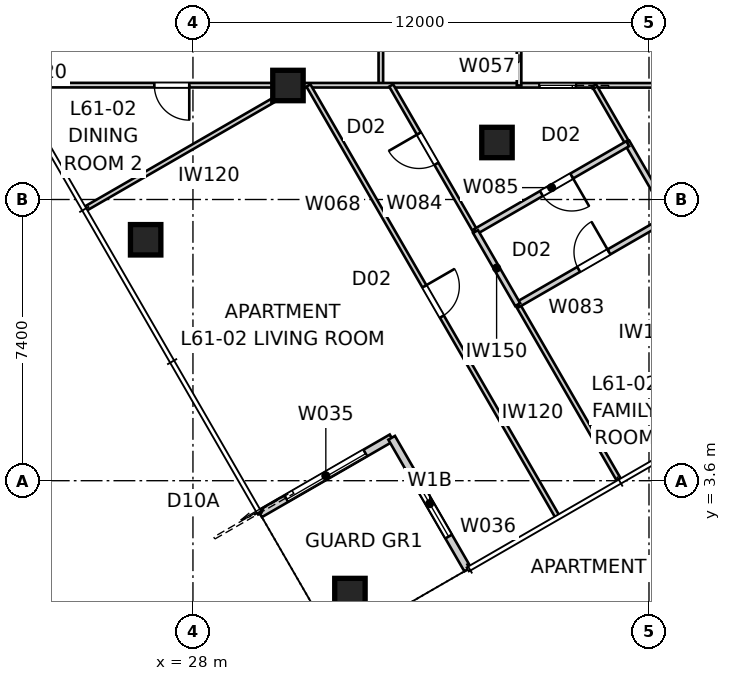
"""IFC4 building model, lengths in metres.
Left out: names, types, materials, properties, quantities, classifications, styles, units other than length and angle.
Written with IfcOpenShell. Run it as: python <this file> out.ifc"""

import sys

from ifc_helpers import new_model, si_unit, direction, frame, frame_2d, origin, origin_2d, place, context, subcontext, project, spatial, rectangle, extrude, element, fill, save


model = new_model("IFC4")
c1 = context("Model", 3, precision=1e-05, world=origin(), true_north=direction((0.0, 1.0)))
c2 = subcontext(c1, "Body", "Model", "MODEL_VIEW")
j1 = project(units=[si_unit("LENGTHUNIT", "METRE"), si_unit("PLANEANGLEUNIT", "RADIAN")], contexts=[c1])
p1 = place(None, origin())
s1 = spatial("IfcSite", under=j1, at=p1, CompositionType="ELEMENT")
p2 = place(p1, origin())
s2 = spatial("IfcBuilding", under=s1, at=p2, CompositionType="ELEMENT")
p3 = place(p2, frame((0.0, 0.0, 221.8)))
s3 = spatial("IfcBuildingStorey", under=s2, at=p3, CompositionType="ELEMENT", Elevation=221.8)
for number, where, z_axis, x_axis in (
    (1, (32.13, 0.63, 0.0), (0.0, 0.0, 1.0), (1.0, 0.0, 0.0)),
    (2, (26.755, 9.94, 0.0), (0.0, 0.0, 1.0), (1.0, 0.0, 0.0)),
    (3, (30.5, 14.0, 0.0), (0.0, 0.0, 1.0), (1.0, 0.0, 0.0)),
    (4, (36.0, 12.5, 0.0), (0.0, 0.0, 1.0), (1.0, 0.0, 0.0)),
):
    element("IfcColumn", number, at=place(p3, frame(where, z_axis=z_axis, x_axis=x_axis)), inside=s3, PredefinedType="COLUMN", context=c2, shape_type="SweptSolid", body=[
        extrude(rectangle(XDim=0.8, YDim=0.8, at=origin_2d()), origin(), (0.0, 0.0, 1.0), 3.4),
    ])
p4 = place(p3, frame((29.764, 2.729, 0.0), z_axis=(0.0, 0.0, 1.0), x_axis=(0.866026010844, 0.49999894854, 0.0)))
e5 = element("IfcWall", 5, at=p4, inside=s3, PredefinedType="SOLIDWALL", context=c2, shape_type="SweptSolid", body=[
    extrude(rectangle(XDim=4.0, YDim=0.2, at=frame_2d((2.0, 0.0))), origin(), (0.0, 0.0, 1.0), 3.25),
])
p5 = place(p4, frame((0.8, 0.0, 0.0)))
e6 = element("IfcOpeningElement", 6, at=p5, cuts=e5, PredefinedType="OPENING", context=c2, shape_type="SweptSolid", body=[
    extrude(rectangle(XDim=2.4, YDim=2.1, at=frame_2d((1.2, 1.05))), frame((0.0, 0.11, 0.0), z_axis=(0.0, -1.0, 0.0), x_axis=(1.0, 0.0, 0.0)), (0.0, 0.0, 1.0), 0.22),
])
p6 = place(p3, frame((33.229, 4.729, 0.0), z_axis=(0.0, 0.0, 1.0), x_axis=(0.49999894854, -0.866026010844, 0.0)))
e7 = element("IfcWall", 7, at=p6, inside=s3, PredefinedType="SOLIDWALL", context=c2, shape_type="SweptSolid", body=[
    extrude(rectangle(XDim=4.0, YDim=0.2, at=frame_2d((2.0, 0.0))), origin(), (0.0, 0.0, 1.0), 3.25),
])
p7 = place(p6, frame((1.0, 0.0, 0.45)))
e8 = element("IfcOpeningElement", 8, at=p7, cuts=e7, PredefinedType="OPENING", context=c2, shape_type="SweptSolid", body=[
    extrude(rectangle(XDim=2.0, YDim=1.8, at=frame_2d((1.0, 0.9))), frame((0.0, 0.11, 0.0), z_axis=(0.0, -1.0, 0.0), x_axis=(1.0, 0.0, 0.0)), (0.0, 0.0, 1.0), 0.22),
])
p8 = place(p3, frame((32.944, 17.9, 0.0), z_axis=(0.0, 0.0, 1.0), x_axis=(0.0, -1.0, 0.0)))
e9 = element("IfcWall", 9, at=p8, inside=s3, PredefinedType="PARTITIONING", context=c2, shape_type="SweptSolid", body=[
    extrude(rectangle(XDim=3.9, YDim=0.12, at=frame_2d((1.95, 0.0))), origin(), (0.0, 0.0, 1.0), 3.25),
])
p9 = place(p8, frame((1.849, 0.0, 0.0)))
e10 = element("IfcOpeningElement", 10, at=p9, cuts=e9, PredefinedType="OPENING", context=c2, shape_type="SweptSolid", body=[
    extrude(rectangle(XDim=0.92, YDim=2.34, at=frame_2d((0.46, 1.17))), frame((0.0, 0.07, 0.0), z_axis=(0.0, -1.0, 0.0), x_axis=(1.0, 0.0, 0.0)), (0.0, 0.0, 1.0), 0.14),
])
p10 = place(p3, frame((51.757, 14.0, 0.0), z_axis=(0.0, 0.0, 1.0), x_axis=(-0.999999938148, 0.000351716958, 0.0)))
e11 = element("IfcWall", 11, at=p10, inside=s3, PredefinedType="PARTITIONING", context=c2, shape_type="SweptSolid", body=[
    extrude(rectangle(XDim=28.46, YDim=0.12, at=frame_2d((14.23, 0.0))), origin(), (0.0, 0.0, 1.0), 2.55),
])
p11 = place(p10, frame((3.82, 0.0, 0.0)))
e12 = element("IfcOpeningElement", 12, at=p11, cuts=e11, PredefinedType="OPENING", context=c2, shape_type="SweptSolid", body=[
    extrude(rectangle(XDim=0.92, YDim=2.34, at=frame_2d((0.46, 1.17))), frame((0.0, 0.07, 0.0), z_axis=(0.0, -1.0, 0.0), x_axis=(1.0, 0.0, 0.0)), (0.0, 0.0, 1.0), 0.14),
])
p12 = place(p10, frame((9.17, 0.0, 0.0)))
e13 = element("IfcOpeningElement", 13, at=p12, cuts=e11, PredefinedType="OPENING", context=c2, shape_type="SweptSolid", body=[
    extrude(rectangle(XDim=0.96, YDim=2.1, at=frame_2d((0.48, 1.05))), frame((0.0, 0.07, 0.0), z_axis=(0.0, -1.0, 0.0), x_axis=(1.0, 0.0, 0.0)), (0.0, 0.0, 1.0), 0.14),
])
p13 = place(p10, frame((13.68, 0.0, 0.0)))
e14 = element("IfcOpeningElement", 14, at=p13, cuts=e11, PredefinedType="OPENING", context=c2, shape_type="SweptSolid", body=[
    extrude(rectangle(XDim=0.96, YDim=2.1, at=frame_2d((0.48, 1.05))), frame((0.0, 0.07, 0.0), z_axis=(0.0, -1.0, 0.0), x_axis=(1.0, 0.0, 0.0)), (0.0, 0.0, 1.0), 0.14),
])
p14 = place(p10, frame((23.854, 0.0, 0.0)))
e15 = element("IfcOpeningElement", 15, at=p14, cuts=e11, PredefinedType="OPENING", context=c2, shape_type="SweptSolid", body=[
    extrude(rectangle(XDim=0.92, YDim=2.34, at=frame_2d((0.46, 1.17))), frame((0.0, 0.07, 0.0), z_axis=(0.0, -1.0, 0.0), x_axis=(1.0, 0.0, 0.0)), (0.0, 0.0, 1.0), 0.14),
])
p15 = place(p3, frame((36.581, 14.0, 0.0), z_axis=(0.0, 0.0, 1.0), x_axis=(0.0, 1.0, 0.0)))
e16 = element("IfcWall", 16, at=p15, inside=s3, PredefinedType="PARTITIONING", context=c2, shape_type="SweptSolid", body=[
    extrude(rectangle(XDim=3.9, YDim=0.12, at=frame_2d((1.95, 0.0))), origin(), (0.0, 0.0, 1.0), 3.25),
])
p16 = place(p15, frame((1.47, 0.0, 0.0)))
e17 = element("IfcOpeningElement", 17, at=p16, cuts=e16, PredefinedType="OPENING", context=c2, shape_type="SweptSolid", body=[
    extrude(rectangle(XDim=0.96, YDim=2.1, at=frame_2d((0.48, 1.05))), frame((0.0, 0.07, 0.0), z_axis=(0.0, -1.0, 0.0), x_axis=(1.0, 0.0, 0.0)), (0.0, 0.0, 1.0), 0.14),
])
p17 = place(p3, frame((31.039, 14.0, 0.0), z_axis=(0.0, 0.0, 1.0), x_axis=(0.500006184843, -0.866021832934, 0.0)))
e18 = element("IfcWall", 18, at=p17, inside=s3, PredefinedType="PARTITIONING", context=c2, shape_type="SweptSolid", body=[
    extrude(rectangle(XDim=13.084, YDim=0.12, at=frame_2d((6.542, 0.0))), origin(), (0.0, 0.0, 1.0), 3.25),
])
p18 = place(p17, frame((6.102, 0.0, 0.0)))
e19 = element("IfcOpeningElement", 19, at=p18, cuts=e18, PredefinedType="OPENING", context=c2, shape_type="SweptSolid", body=[
    extrude(rectangle(XDim=0.92, YDim=2.34, at=frame_2d((0.46, 1.17))), frame((0.0, 0.07, 0.0), z_axis=(0.0, -1.0, 0.0), x_axis=(1.0, 0.0, 0.0)), (0.0, 0.0, 1.0), 0.14),
])
p19 = place(p3, frame((25.174, 10.759, 0.0), z_axis=(0.0, 0.0, 1.0), x_axis=(0.866023120914, 0.500003954026, 0.0)))
e20 = element("IfcWall", 20, at=p19, inside=s3, PredefinedType="PARTITIONING", context=c2, shape_type="SweptSolid", body=[
    extrude(rectangle(XDim=6.481, YDim=0.12, at=frame_2d((3.241, 0.0))), origin(), (0.0, 0.0, 1.0), 3.25),
])
p20 = place(p3, frame((39.416, 12.512, 0.0), z_axis=(0.0, 0.0, 1.0), x_axis=(-0.500005339912, 0.866022320763, 0.0)))
e21 = element("IfcWall", 21, at=p20, inside=s3, PredefinedType="PARTITIONING", context=c2, shape_type="SweptSolid", body=[
    extrude(rectangle(XDim=1.718, YDim=0.12, at=frame_2d((0.859, 0.0))), origin(), (0.0, 0.0, 1.0), 3.25),
])
p21 = place(p3, frame((40.525, 10.59, 0.0), z_axis=(0.0, 0.0, 1.0), x_axis=(-0.499973265211, 0.866040838572, 0.0)))
e22 = element("IfcWall", 22, at=p21, inside=s3, PredefinedType="SOLIDWALL", context=c2, shape_type="SweptSolid", body=[
    extrude(rectangle(XDim=2.219, YDim=0.15, at=frame_2d((1.109, 0.0))), origin(), (0.0, 0.0, 1.0), 3.25),
])
p22 = place(p3, frame((39.214, 3.612, 0.0), z_axis=(0.0, 0.0, 1.0), x_axis=(-0.499995631649, 0.866027925839, 0.0)))
e23 = element("IfcWall", 23, at=p22, inside=s3, PredefinedType="PARTITIONING", context=c2, shape_type="SweptSolid", body=[
    extrude(rectangle(XDim=5.338, YDim=0.12, at=frame_2d((2.669, 0.0))), origin(), (0.0, 0.0, 1.0), 3.25),
])
p23 = place(p3, frame((36.545, 8.234, 0.0), z_axis=(0.0, 0.0, 1.0), x_axis=(0.866025598446, 0.499999662836, 0.0)))
e24 = element("IfcWall", 24, at=p23, inside=s3, PredefinedType="SOLIDWALL", context=c2, shape_type="SweptSolid", body=[
    extrude(rectangle(XDim=4.625, YDim=0.15, at=frame_2d((2.312, 0.0))), origin(), (0.0, 0.0, 1.0), 3.25),
])
p24 = place(p23, frame((1.853, 0.0, 0.0)))
e25 = element("IfcOpeningElement", 25, at=p24, cuts=e24, PredefinedType="OPENING", context=c2, shape_type="SweptSolid", body=[
    extrude(rectangle(XDim=0.92, YDim=2.34, at=frame_2d((0.46, 1.17))), frame((0.0, 0.085, 0.0), z_axis=(0.0, -1.0, 0.0), x_axis=(1.0, 0.0, 0.0)), (0.0, 0.0, 1.0), 0.17),
])
p25 = place(p3, frame((35.435, 10.156, 0.0), z_axis=(0.0, 0.0, 1.0), x_axis=(-0.499966886051, 0.866044521288, 0.0)))
e26 = element("IfcWall", 26, at=p25, inside=s3, PredefinedType="PARTITIONING", context=c2, shape_type="SweptSolid", body=[
    extrude(rectangle(XDim=4.438, YDim=0.12, at=frame_2d((2.219, 0.0))), origin(), (0.0, 0.0, 1.0), 3.25),
])
p26 = place(p25, frame((2.059, 0.0, 0.0)))
e27 = element("IfcOpeningElement", 27, at=p26, cuts=e26, PredefinedType="OPENING", context=c2, shape_type="SweptSolid", body=[
    extrude(rectangle(XDim=0.92, YDim=2.34, at=frame_2d((0.46, 1.17))), frame((0.0, 0.07, 0.0), z_axis=(0.0, -1.0, 0.0), x_axis=(1.0, 0.0, 0.0)), (0.0, 0.0, 1.0), 0.14),
])
p27 = place(p3, frame((39.441, 12.469, 0.0), z_axis=(0.0, 0.0, 1.0), x_axis=(-0.866025598446, -0.499999662836, 0.0)))
e28 = element("IfcWall", 28, at=p27, inside=s3, PredefinedType="SOLIDWALL", context=c2, shape_type="SweptSolid", body=[
    extrude(rectangle(XDim=4.625, YDim=0.15, at=frame_2d((2.312, 0.0))), origin(), (0.0, 0.0, 1.0), 3.25),
])
p28 = place(p27, frame((1.702, 0.0, 0.0)))
e29 = element("IfcOpeningElement", 29, at=p28, cuts=e28, PredefinedType="OPENING", context=c2, shape_type="SweptSolid", body=[
    extrude(rectangle(XDim=0.92, YDim=2.34, at=frame_2d((0.46, 1.17))), frame((0.0, 0.085, 0.0), z_axis=(0.0, -1.0, 0.0), x_axis=(1.0, 0.0, 0.0)), (0.0, 0.0, 1.0), 0.17),
])
p29 = place(p3, frame((35.435, 10.156, 0.0), z_axis=(0.0, 0.0, 1.0), x_axis=(0.500008142102, -0.866020702889, 0.0)))
e30 = element("IfcWall", 30, at=p29, inside=s3, PredefinedType="SOLIDWALL", context=c2, shape_type="SweptSolid", body=[
    extrude(rectangle(XDim=2.219, YDim=0.15, at=frame_2d((1.11, 0.0))), origin(), (0.0, 0.0, 1.0), 3.25),
])
p30 = place(p5, origin())
e31 = element("IfcDoor", 31, at=p30, inside=s3, OperationType="SLIDING_TO_LEFT", PredefinedType="DOOR", context=c2, shape_type="SweptSolid", body=[
    extrude(rectangle(XDim=2.4, YDim=2.1, at=frame_2d((1.2, 1.05))), frame((0.0, 0.025, 0.0), z_axis=(0.0, -1.0, 0.0), x_axis=(1.0, 0.0, 0.0)), (0.0, 0.0, 1.0), 0.05),
])
fill(e6, e31)
p31 = place(p7, origin())
e32 = element("IfcWindow", 32, at=p31, inside=s3, PartitioningType="SINGLE_PANEL", PredefinedType="WINDOW", context=c2, shape_type="SweptSolid", body=[
    extrude(rectangle(XDim=2.0, YDim=1.8, at=frame_2d((1.0, 0.9))), frame((0.0, 0.03, 0.0), z_axis=(0.0, -1.0, 0.0), x_axis=(1.0, 0.0, 0.0)), (0.0, 0.0, 1.0), 0.06),
])
fill(e8, e32)
p32 = place(p13, origin())
e33 = element("IfcDoor", 33, at=p32, inside=s3, OperationType="SLIDING_TO_LEFT", PredefinedType="DOOR", context=c2, shape_type="SweptSolid", body=[
    extrude(rectangle(XDim=0.96, YDim=2.1, at=frame_2d((0.48, 1.05))), frame((0.0, 0.025, 0.0), z_axis=(0.0, -1.0, 0.0), x_axis=(1.0, 0.0, 0.0)), (0.0, 0.0, 1.0), 0.05),
])
fill(e14, e33)
p33 = place(p28, origin())
e34 = element("IfcDoor", 34, at=p33, inside=s3, OperationType="SINGLE_SWING_LEFT", PredefinedType="DOOR", context=c2, shape_type="SweptSolid", body=[
    extrude(rectangle(XDim=0.92, YDim=2.34, at=frame_2d((0.46, 1.17))), frame((0.0, 0.025, 0.0), z_axis=(0.0, -1.0, 0.0), x_axis=(1.0, 0.0, 0.0)), (0.0, 0.0, 1.0), 0.05),
])
fill(e29, e34)
p34 = place(p26, origin())
e35 = element("IfcDoor", 35, at=p34, inside=s3, OperationType="SINGLE_SWING_RIGHT", PredefinedType="DOOR", context=c2, shape_type="SweptSolid", body=[
    extrude(rectangle(XDim=0.92, YDim=2.34, at=frame_2d((0.46, 1.17))), frame((0.0, 0.025, 0.0), z_axis=(0.0, -1.0, 0.0), x_axis=(1.0, 0.0, 0.0)), (0.0, 0.0, 1.0), 0.05),
])
fill(e27, e35)
p35 = place(p14, origin())
e36 = element("IfcDoor", 36, at=p35, inside=s3, OperationType="SINGLE_SWING_LEFT", PredefinedType="DOOR", context=c2, shape_type="SweptSolid", body=[
    extrude(rectangle(XDim=0.92, YDim=2.34, at=frame_2d((0.46, 1.17))), frame((0.0, 0.025, 0.0), z_axis=(0.0, -1.0, 0.0), x_axis=(1.0, 0.0, 0.0)), (0.0, 0.0, 1.0), 0.05),
])
fill(e15, e36)
p36 = place(p24, origin())
e37 = element("IfcDoor", 37, at=p36, inside=s3, OperationType="SINGLE_SWING_RIGHT", PredefinedType="DOOR", context=c2, shape_type="SweptSolid", body=[
    extrude(rectangle(XDim=0.92, YDim=2.34, at=frame_2d((0.46, 1.17))), frame((0.0, 0.025, 0.0), z_axis=(0.0, -1.0, 0.0), x_axis=(1.0, 0.0, 0.0)), (0.0, 0.0, 1.0), 0.05),
])
fill(e25, e37)
p37 = place(p18, origin())
e38 = element("IfcDoor", 38, at=p37, inside=s3, OperationType="SINGLE_SWING_LEFT", PredefinedType="DOOR", context=c2, shape_type="SweptSolid", body=[
    extrude(rectangle(XDim=0.92, YDim=2.34, at=frame_2d((0.46, 1.17))), frame((0.0, 0.025, 0.0), z_axis=(0.0, -1.0, 0.0), x_axis=(1.0, 0.0, 0.0)), (0.0, 0.0, 1.0), 0.05),
])
fill(e19, e38)
save(model, sys.argv[1])
